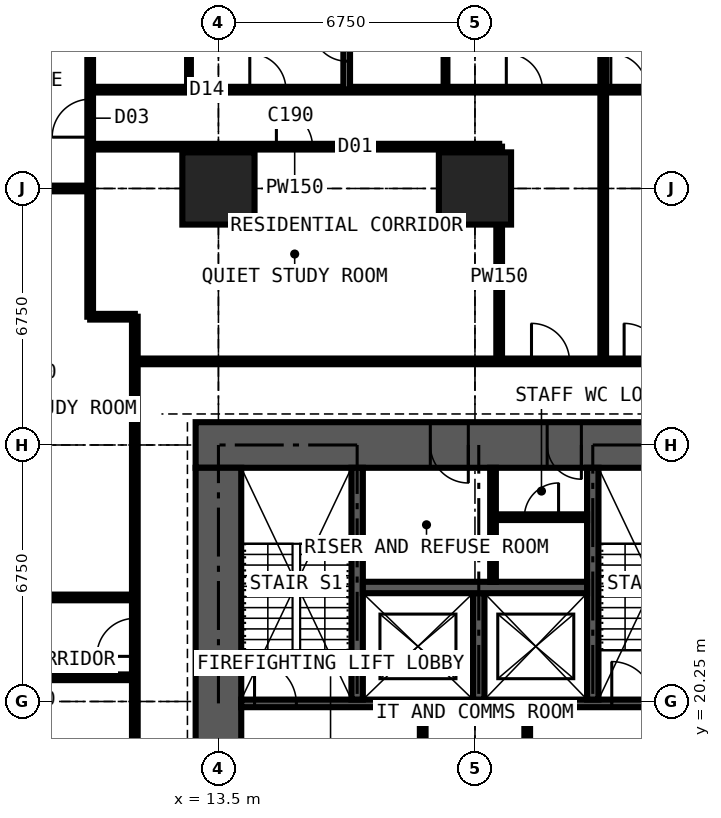
"""IFC4 building model, lengths in metres.
Left out: names, types, materials, properties, quantities, classifications, styles, units other than length and angle.
Written with IfcOpenShell. Run it as: python <this file> out.ifc"""

import sys

from ifc_helpers import new_model, si_unit, direction, frame, frame_2d, origin, origin_2d, place, context, subcontext, project, spatial, rectangle, extrude, element, fill, save


model = new_model("IFC4")
c1 = context("Model", 3, precision=1e-05, world=origin(), true_north=direction((0.0, 1.0)))
c2 = subcontext(c1, "Body", "Model", "MODEL_VIEW")
j1 = project(units=[si_unit("LENGTHUNIT", "METRE"), si_unit("PLANEANGLEUNIT", "RADIAN")], contexts=[c1])
p1 = place(None, origin())
s1 = spatial("IfcSite", under=j1, at=p1, CompositionType="ELEMENT")
p2 = place(p1, origin())
s2 = spatial("IfcBuilding", under=s1, at=p2, CompositionType="ELEMENT")
p3 = place(p2, frame((0.0, 0.0, 36.0)))
s3 = spatial("IfcBuildingStorey", under=s2, at=p3, CompositionType="ELEMENT", Elevation=36.0)
for number, where, z_axis, x_axis in (
    (1, (13.5, 33.75, 0.0), (0.0, 0.0, 1.0), (1.0, 0.0, 0.0)),
    (2, (20.25, 33.75, 0.0), (0.0, 0.0, 1.0), (1.0, 0.0, 0.0)),
):
    element("IfcColumn", number, at=place(p3, frame(where, z_axis=z_axis, x_axis=x_axis)), inside=s3, PredefinedType="COLUMN", context=c2, shape_type="SweptSolid", body=[
        extrude(rectangle(XDim=1.9, YDim=1.9, at=origin_2d()), origin(), (0.0, 0.0, 1.0), 3.6),
    ])
p4 = place(p3, frame((27.6, 27.0, 0.0), z_axis=(0.0, 0.0, 1.0), x_axis=(-1.0, 0.0, 0.0)))
e3 = element("IfcWall", 3, at=p4, inside=s3, PredefinedType="SHEAR", context=c2, shape_type="SweptSolid", body=[
    extrude(rectangle(XDim=14.7, YDim=1.2, at=frame_2d((7.35, 0.0))), origin(), (0.0, 0.0, 1.0), 3.6),
])
p5 = place(p4, frame((4.55, 0.0, 0.0)))
e4 = element("IfcOpeningElement", 4, at=p5, cuts=e3, PredefinedType="OPENING", context=c2, shape_type="SweptSolid", body=[
    extrude(rectangle(XDim=0.9, YDim=2.2, at=frame_2d((0.45, 1.1))), frame((0.0, 0.61, 0.0), z_axis=(0.0, -1.0, 0.0), x_axis=(1.0, 0.0, 0.0)), (0.0, 0.0, 1.0), 1.22),
])
p6 = place(p4, frame((7.525, 0.0, 0.0)))
e5 = element("IfcOpeningElement", 5, at=p6, cuts=e3, PredefinedType="OPENING", context=c2, shape_type="SweptSolid", body=[
    extrude(rectangle(XDim=1.0, YDim=2.2, at=frame_2d((0.5, 1.1))), frame((0.0, 0.61, 0.0), z_axis=(0.0, -1.0, 0.0), x_axis=(1.0, 0.0, 0.0)), (0.0, 0.0, 1.0), 1.22),
])
p7 = place(p3, frame((13.5, 26.4, 0.0), z_axis=(0.0, 0.0, 1.0), x_axis=(0.0, -1.0, 0.0)))
e6 = element("IfcWall", 6, at=p7, inside=s3, PredefinedType="SHEAR", context=c2, shape_type="SweptSolid", body=[
    extrude(rectangle(XDim=12.3, YDim=1.2, at=frame_2d((6.15, 0.0))), origin(), (0.0, 0.0, 1.0), 3.6),
])
p8 = place(p7, frame((7.45, 0.0, 0.0)))
e7 = element("IfcOpeningElement", 7, at=p8, cuts=e6, PredefinedType="OPENING", context=c2, shape_type="SweptSolid", body=[
    extrude(rectangle(XDim=1.2, YDim=2.2, at=frame_2d((0.6, 1.1))), frame((0.0, 0.61, 0.0), z_axis=(0.0, -1.0, 0.0), x_axis=(1.0, 0.0, 0.0)), (0.0, 0.0, 1.0), 1.22),
])
p9 = place(p3, frame((14.1, 20.2, 0.0), z_axis=(0.0, 0.0, 1.0), x_axis=(1.0, 0.0, 0.0)))
e8 = element("IfcWall", 8, at=p9, inside=s3, PredefinedType="SHEAR", context=c2, shape_type="SweptSolid", body=[
    extrude(rectangle(XDim=12.3, YDim=0.2, at=frame_2d((6.15, 0.0))), origin(), (0.0, 0.0, 1.0), 3.6),
])
p10 = place(p9, frame((0.35, 0.0, 0.0)))
e9 = element("IfcOpeningElement", 9, at=p10, cuts=e8, PredefinedType="OPENING", context=c2, shape_type="SweptSolid", body=[
    extrude(rectangle(XDim=1.1, YDim=2.2, at=frame_2d((0.55, 1.1))), frame((0.0, 0.11, 0.0), z_axis=(0.0, -1.0, 0.0), x_axis=(1.0, 0.0, 0.0)), (0.0, 0.0, 1.0), 0.22),
])
p11 = place(p9, frame((9.75, 0.0, 0.0)))
e10 = element("IfcOpeningElement", 10, at=p11, cuts=e8, PredefinedType="OPENING", context=c2, shape_type="SweptSolid", body=[
    extrude(rectangle(XDim=1.1, YDim=2.2, at=frame_2d((0.55, 1.1))), frame((0.0, 0.11, 0.0), z_axis=(0.0, -1.0, 0.0), x_axis=(1.0, 0.0, 0.0)), (0.0, 0.0, 1.0), 0.22),
])
for number, where, z_axis, x_axis in (
    (11, (17.15, 20.3, 0.0), (0.0, 0.0, 1.0), (0.0, 1.0, 0.0)),
    (12, (23.35, 20.3, 0.0), (0.0, 0.0, 1.0), (0.0, 1.0, 0.0)),
):
    element("IfcWall", number, at=place(p3, frame(where, z_axis=z_axis, x_axis=x_axis)), inside=s3, PredefinedType="SHEAR", context=c2, shape_type="SweptSolid", body=[
        extrude(rectangle(XDim=6.1, YDim=0.3, at=frame_2d((3.05, 0.0))), origin(), (0.0, 0.0, 1.0), 3.6),
    ])
p12 = place(p3, frame((20.35, 20.3, 0.0), z_axis=(0.0, 0.0, 1.0), x_axis=(0.0, 1.0, 0.0)))
e13 = element("IfcWall", 13, at=p12, inside=s3, PredefinedType="SHEAR", context=c2, shape_type="SweptSolid", body=[
    extrude(rectangle(XDim=2.8, YDim=0.3, at=frame_2d((1.4, 0.0))), origin(), (0.0, 0.0, 1.0), 3.6),
])
p13 = place(p3, frame((17.3, 23.25, 0.0), z_axis=(0.0, 0.0, 1.0), x_axis=(1.0, 0.0, 0.0)))
e14 = element("IfcWall", 14, at=p13, inside=s3, PredefinedType="SHEAR", context=c2, shape_type="SweptSolid", body=[
    extrude(rectangle(XDim=5.9, YDim=0.3, at=frame_2d((2.95, 0.0))), origin(), (0.0, 0.0, 1.0), 3.6),
])
p14 = place(p3, frame((18.875, 16.6, 0.0), z_axis=(0.0, 0.0, 1.0), x_axis=(0.0, 1.0, 0.0)))
e15 = element("IfcWall", 15, at=p14, inside=s3, PredefinedType="PARTITIONING", context=c2, shape_type="SweptSolid", body=[
    extrude(rectangle(XDim=3.5, YDim=0.15, at=frame_2d((1.75, 0.0))), origin(), (0.0, 0.0, 1.0), 3.375),
])
p15 = place(p14, frame((1.15, 0.0, 0.0)))
e16 = element("IfcOpeningElement", 16, at=p15, cuts=e15, PredefinedType="OPENING", context=c2, shape_type="SweptSolid", body=[
    extrude(rectangle(XDim=1.2, YDim=2.2, at=frame_2d((0.6, 1.1))), frame((0.0, 0.085, 0.0), z_axis=(0.0, -1.0, 0.0), x_axis=(1.0, 0.0, 0.0)), (0.0, 0.0, 1.0), 0.17),
])
p16 = place(p3, frame((21.625, 16.6, 0.0), z_axis=(0.0, 0.0, 1.0), x_axis=(0.0, 1.0, 0.0)))
e17 = element("IfcWall", 17, at=p16, inside=s3, PredefinedType="PARTITIONING", context=c2, shape_type="SweptSolid", body=[
    extrude(rectangle(XDim=3.5, YDim=0.15, at=frame_2d((1.75, 0.0))), origin(), (0.0, 0.0, 1.0), 3.375),
])
p17 = place(p16, frame((1.15, 0.0, 0.0)))
e18 = element("IfcOpeningElement", 18, at=p17, cuts=e17, PredefinedType="OPENING", context=c2, shape_type="SweptSolid", body=[
    extrude(rectangle(XDim=1.2, YDim=2.2, at=frame_2d((0.6, 1.1))), frame((0.0, 0.085, 0.0), z_axis=(0.0, -1.0, 0.0), x_axis=(1.0, 0.0, 0.0)), (0.0, 0.0, 1.0), 0.17),
])
p18 = place(p3, frame((20.725, 23.4, 0.0), z_axis=(0.0, 0.0, 1.0), x_axis=(0.0, 1.0, 0.0)))
e19 = element("IfcWall", 19, at=p18, inside=s3, PredefinedType="PARTITIONING", context=c2, shape_type="SweptSolid", body=[
    extrude(rectangle(XDim=3.0, YDim=0.15, at=frame_2d((1.5, 0.0))), origin(), (0.0, 0.0, 1.0), 3.375),
])
p19 = place(p3, frame((20.8, 25.1, 0.0), z_axis=(0.0, 0.0, 1.0), x_axis=(1.0, 0.0, 0.0)))
e20 = element("IfcWall", 20, at=p19, inside=s3, PredefinedType="PARTITIONING", context=c2, shape_type="SweptSolid", body=[
    extrude(rectangle(XDim=2.4, YDim=0.15, at=frame_2d((1.2, 0.0))), origin(), (0.0, 0.0, 1.0), 3.375),
])
p20 = place(p19, frame((0.75, 0.0, 0.0)))
e21 = element("IfcOpeningElement", 21, at=p20, cuts=e20, PredefinedType="OPENING", context=c2, shape_type="SweptSolid", body=[
    extrude(rectangle(XDim=0.9, YDim=2.2, at=frame_2d((0.45, 1.1))), frame((0.0, 0.085, 0.0), z_axis=(0.0, -1.0, 0.0), x_axis=(1.0, 0.0, 0.0)), (0.0, 0.0, 1.0), 0.17),
])
p21 = place(p3, frame((4.15, 33.75, 0.0), z_axis=(0.0, 0.0, 1.0), x_axis=(1.0, 0.0, 0.0)))
e22 = element("IfcWall", 22, at=p21, inside=s3, PredefinedType="PARTITIONING", context=c2, shape_type="SweptSolid", body=[
    extrude(rectangle(XDim=5.975, YDim=0.15, at=frame_2d((2.988, 0.0))), origin(), (0.0, 0.0, 1.0), 2.877),
])
for number, where, z_axis, x_axis in (
    (23, (5.65, 20.887, 0.0), (0.0, 0.0, 1.0), (1.0, 0.0, 0.0)),
    (24, (5.65, 22.988, 0.0), (0.0, 0.0, 1.0), (1.0, 0.0, 0.0)),
):
    element("IfcWall", number, at=place(p3, frame(where, z_axis=z_axis, x_axis=x_axis)), inside=s3, PredefinedType="PARTITIONING", context=c2, shape_type="SweptSolid", body=[
        extrude(rectangle(XDim=5.65, YDim=0.15, at=frame_2d((2.825, 0.0))), origin(), (0.0, 0.0, 1.0), 3.375),
    ])
p22 = place(p3, frame((10.125, 30.375, 0.0), z_axis=(0.0, 0.0, 1.0), x_axis=(0.0, 1.0, 0.0)))
e25 = element("IfcWall", 25, at=p22, inside=s3, PredefinedType="PARTITIONING", context=c2, shape_type="SweptSolid", body=[
    extrude(rectangle(XDim=10.859, YDim=0.15, at=frame_2d((5.429, 0.0))), origin(), (0.0, 0.0, 1.0), 3.375),
])
p23 = place(p22, frame((4.725, 0.0, 0.0)))
e26 = element("IfcOpeningElement", 26, at=p23, cuts=e25, PredefinedType="OPENING", context=c2, shape_type="SweptSolid", body=[
    extrude(rectangle(XDim=1.0, YDim=2.2, at=frame_2d((0.5, 1.1))), frame((0.0, 0.085, 0.0), z_axis=(0.0, -1.0, 0.0), x_axis=(1.0, 0.0, 0.0)), (0.0, 0.0, 1.0), 0.17),
])
p24 = place(p3, frame((10.125, 30.375, 0.0), z_axis=(0.0, 0.0, 1.0), x_axis=(1.0, 0.0, 0.0)))
e27 = element("IfcWall", 27, at=p24, inside=s3, PredefinedType="PARTITIONING", context=c2, shape_type="SweptSolid", body=[
    extrude(rectangle(XDim=1.175, YDim=0.15, at=frame_2d((0.587, 0.0))), origin(), (0.0, 0.0, 1.0), 3.375),
])
p25 = place(p3, frame((10.125, 34.85, 0.0), z_axis=(0.0, 0.0, 1.0), x_axis=(1.0, 0.0, 0.0)))
e28 = element("IfcWall", 28, at=p25, inside=s3, PredefinedType="PARTITIONING", context=c2, shape_type="SweptSolid", body=[
    extrude(rectangle(XDim=10.762, YDim=0.15, at=frame_2d((5.381, 0.0))), origin(), (0.0, 0.0, 1.0), 3.375),
])
p26 = place(p25, frame((4.9, 0.0, 0.0)))
e29 = element("IfcOpeningElement", 29, at=p26, cuts=e28, PredefinedType="OPENING", context=c2, shape_type="SweptSolid", body=[
    extrude(rectangle(XDim=0.95, YDim=2.2, at=frame_2d((0.475, 1.1))), frame((0.0, 0.085, 0.0), z_axis=(0.0, -1.0, 0.0), x_axis=(1.0, 0.0, 0.0)), (0.0, 0.0, 1.0), 0.17),
])
p27 = place(p3, frame((10.125, 36.35, 0.0), z_axis=(0.0, 0.0, 1.0), x_axis=(1.0, 0.0, 0.0)))
e30 = element("IfcWall", 30, at=p27, inside=s3, PredefinedType="PARTITIONING", context=c2, shape_type="SweptSolid", body=[
    extrude(rectangle(XDim=23.625, YDim=0.15, at=frame_2d((11.812, 0.0))), origin(), (0.0, 0.0, 1.0), 3.375),
])
p28 = place(p27, frame((20.5, 0.0, 0.0)))
e31 = element("IfcOpeningElement", 31, at=p28, cuts=e30, PredefinedType="OPENING", context=c2, shape_type="SweptSolid", body=[
    extrude(rectangle(XDim=0.95, YDim=2.2, at=frame_2d((0.475, 1.1))), frame((0.0, 0.085, 0.0), z_axis=(0.0, -1.0, 0.0), x_axis=(1.0, 0.0, 0.0)), (0.0, 0.0, 1.0), 0.17),
])
p29 = place(p27, frame((17.125, 0.0, 0.0)))
e32 = element("IfcOpeningElement", 32, at=p29, cuts=e30, PredefinedType="OPENING", context=c2, shape_type="SweptSolid", body=[
    extrude(rectangle(XDim=0.95, YDim=2.2, at=frame_2d((0.475, 1.1))), frame((0.0, 0.085, 0.0), z_axis=(0.0, -1.0, 0.0), x_axis=(1.0, 0.0, 0.0)), (0.0, 0.0, 1.0), 0.17),
])
p30 = place(p27, frame((13.7, 0.0, 0.0)))
e33 = element("IfcOpeningElement", 33, at=p30, cuts=e30, PredefinedType="OPENING", context=c2, shape_type="SweptSolid", body=[
    extrude(rectangle(XDim=0.95, YDim=2.2, at=frame_2d((0.475, 1.1))), frame((0.0, 0.085, 0.0), z_axis=(0.0, -1.0, 0.0), x_axis=(1.0, 0.0, 0.0)), (0.0, 0.0, 1.0), 0.17),
])
p31 = place(p27, frame((4.2, 0.0, 0.0)))
e34 = element("IfcOpeningElement", 34, at=p31, cuts=e30, PredefinedType="OPENING", context=c2, shape_type="SweptSolid", body=[
    extrude(rectangle(XDim=0.95, YDim=2.2, at=frame_2d((0.475, 1.1))), frame((0.0, 0.085, 0.0), z_axis=(0.0, -1.0, 0.0), x_axis=(1.0, 0.0, 0.0)), (0.0, 0.0, 1.0), 0.17),
])
p32 = place(p27, frame((10.95, 0.0, 0.0)))
e35 = element("IfcOpeningElement", 35, at=p32, cuts=e30, PredefinedType="OPENING", context=c2, shape_type="SweptSolid", body=[
    extrude(rectangle(XDim=0.95, YDim=2.2, at=frame_2d((0.475, 1.1))), frame((0.0, 0.085, 0.0), z_axis=(0.0, -1.0, 0.0), x_axis=(1.0, 0.0, 0.0)), (0.0, 0.0, 1.0), 0.17),
])
p33 = place(p3, frame((11.3, 11.3, 0.0), z_axis=(0.0, 0.0, 1.0), x_axis=(0.0, 1.0, 0.0)))
e36 = element("IfcWall", 36, at=p33, inside=s3, PredefinedType="PARTITIONING", context=c2, shape_type="SweptSolid", body=[
    extrude(rectangle(XDim=19.075, YDim=0.15, at=frame_2d((9.538, 0.0))), origin(), (0.0, 0.0, 1.0), 3.375),
])
p34 = place(p33, frame((10.137, 0.0, 0.0)))
e37 = element("IfcOpeningElement", 37, at=p34, cuts=e36, PredefinedType="OPENING", context=c2, shape_type="SweptSolid", body=[
    extrude(rectangle(XDim=1.0, YDim=2.2, at=frame_2d((0.5, 1.1))), frame((0.0, 0.085, 0.0), z_axis=(0.0, -1.0, 0.0), x_axis=(1.0, 0.0, 0.0)), (0.0, 0.0, 1.0), 0.17),
])
p35 = place(p3, frame((11.3, 29.2, 0.0), z_axis=(0.0, 0.0, 1.0), x_axis=(1.0, 0.0, 0.0)))
e38 = element("IfcWall", 38, at=p35, inside=s3, PredefinedType="PARTITIONING", context=c2, shape_type="SweptSolid", body=[
    extrude(rectangle(XDim=19.075, YDim=0.15, at=frame_2d((9.538, 0.0))), origin(), (0.0, 0.0, 1.0), 3.375),
])
p36 = place(p35, frame((12.875, 0.0, 0.0)))
e39 = element("IfcOpeningElement", 39, at=p36, cuts=e38, PredefinedType="OPENING", context=c2, shape_type="SweptSolid", body=[
    extrude(rectangle(XDim=1.0, YDim=2.2, at=frame_2d((0.5, 1.1))), frame((0.0, 0.085, 0.0), z_axis=(0.0, -1.0, 0.0), x_axis=(1.0, 0.0, 0.0)), (0.0, 0.0, 1.0), 0.17),
])
p37 = place(p35, frame((10.438, 0.0, 0.0)))
e40 = element("IfcOpeningElement", 40, at=p37, cuts=e38, PredefinedType="OPENING", context=c2, shape_type="SweptSolid", body=[
    extrude(rectangle(XDim=1.0, YDim=2.2, at=frame_2d((0.5, 1.1))), frame((0.0, 0.085, 0.0), z_axis=(0.0, -1.0, 0.0), x_axis=(1.0, 0.0, 0.0)), (0.0, 0.0, 1.0), 0.17),
])
p38 = place(p35, frame((14.875, 0.0, 0.0)))
e41 = element("IfcOpeningElement", 41, at=p38, cuts=e38, PredefinedType="OPENING", context=c2, shape_type="SweptSolid", body=[
    extrude(rectangle(XDim=0.95, YDim=2.2, at=frame_2d((0.475, 1.1))), frame((0.0, 0.085, 0.0), z_axis=(0.0, -1.0, 0.0), x_axis=(1.0, 0.0, 0.0)), (0.0, 0.0, 1.0), 0.17),
])
p39 = place(p3, frame((12.725, 36.35, 0.0), z_axis=(0.0, 0.0, 1.0), x_axis=(0.0, 1.0, 0.0)))
e42 = element("IfcWall", 42, at=p39, inside=s3, PredefinedType="PARTITIONING", context=c2, shape_type="SweptSolid", body=[
    extrude(rectangle(XDim=2.4, YDim=0.1, at=frame_2d((1.2, 0.0))), origin(), (0.0, 0.0, 1.0), 3.375),
])
p40 = place(p3, frame((16.875, 36.35, 0.0), z_axis=(0.0, 0.0, 1.0), x_axis=(0.0, 1.0, 0.0)))
e43 = element("IfcWall", 43, at=p40, inside=s3, PredefinedType="PARTITIONING", context=c2, shape_type="SweptSolid", body=[
    extrude(rectangle(XDim=4.884, YDim=0.175, at=frame_2d((2.442, 0.0))), origin(), (0.0, 0.0, 1.0), 3.375),
])
p41 = place(p40, frame((0.75, 0.0, 0.0)))
e44 = element("IfcOpeningElement", 44, at=p41, cuts=e43, PredefinedType="OPENING", context=c2, shape_type="SweptSolid", body=[
    extrude(rectangle(XDim=0.9, YDim=2.2, at=frame_2d((0.45, 1.1))), frame((0.0, 0.097, 0.0), z_axis=(0.0, -1.0, 0.0), x_axis=(1.0, 0.0, 0.0)), (0.0, 0.0, 1.0), 0.195),
])
p42 = place(p3, frame((19.475, 36.35, 0.0), z_axis=(0.0, 0.0, 1.0), x_axis=(0.0, 1.0, 0.0)))
e45 = element("IfcWall", 45, at=p42, inside=s3, PredefinedType="PARTITIONING", context=c2, shape_type="SweptSolid", body=[
    extrude(rectangle(XDim=2.4, YDim=0.1, at=frame_2d((1.2, 0.0))), origin(), (0.0, 0.0, 1.0), 3.375),
])
p43 = place(p3, frame((20.887, 29.2, 0.0), z_axis=(0.0, 0.0, 1.0), x_axis=(0.0, 1.0, 0.0)))
e46 = element("IfcWall", 46, at=p43, inside=s3, PredefinedType="PARTITIONING", context=c2, shape_type="SweptSolid", body=[
    extrude(rectangle(XDim=5.65, YDim=0.15, at=frame_2d((2.825, 0.0))), origin(), (0.0, 0.0, 1.0), 3.375),
])
p44 = place(p3, frame((23.625, 29.2, 0.0), z_axis=(0.0, 0.0, 1.0), x_axis=(0.0, 1.0, 0.0)))
e47 = element("IfcWall", 47, at=p44, inside=s3, PredefinedType="PARTITIONING", context=c2, shape_type="SweptSolid", body=[
    extrude(rectangle(XDim=12.034, YDim=0.15, at=frame_2d((6.017, 0.0))), origin(), (0.0, 0.0, 1.0), 3.375),
])
p45 = place(p20, origin())
e48 = element("IfcDoor", 48, at=p45, inside=s3, OperationType="SINGLE_SWING_RIGHT", PredefinedType="DOOR", context=c2, shape_type="SweptSolid", body=[
    extrude(rectangle(XDim=0.9, YDim=2.2, at=frame_2d((0.45, 1.1))), frame((0.0, 0.025, 0.0), z_axis=(0.0, -1.0, 0.0), x_axis=(1.0, 0.0, 0.0)), (0.0, 0.0, 1.0), 0.05),
])
fill(e21, e48)
p46 = place(p5, origin())
e49 = element("IfcDoor", 49, at=p46, inside=s3, OperationType="SINGLE_SWING_LEFT", PredefinedType="DOOR", context=c2, shape_type="SweptSolid", body=[
    extrude(rectangle(XDim=0.9, YDim=2.2, at=frame_2d((0.45, 1.1))), frame((0.0, 0.4, 0.0), z_axis=(0.0, -1.0, 0.0), x_axis=(1.0, 0.0, 0.0)), (0.0, 0.0, 1.0), 0.8),
])
fill(e4, e49)
p47 = place(p6, origin())
e50 = element("IfcDoor", 50, at=p47, inside=s3, OperationType="SINGLE_SWING_LEFT", PredefinedType="DOOR", context=c2, shape_type="SweptSolid", body=[
    extrude(rectangle(XDim=1.0, YDim=2.2, at=frame_2d((0.5, 1.1))), frame((0.0, 0.025, 0.0), z_axis=(0.0, -1.0, 0.0), x_axis=(1.0, 0.0, 0.0)), (0.0, 0.0, 1.0), 0.05),
])
fill(e5, e50)
p48 = place(p10, origin())
e51 = element("IfcDoor", 51, at=p48, inside=s3, OperationType="SINGLE_SWING_LEFT", PredefinedType="DOOR", context=c2, shape_type="SweptSolid", body=[
    extrude(rectangle(XDim=1.1, YDim=2.2, at=frame_2d((0.55, 1.1))), frame((0.0, 0.025, 0.0), z_axis=(0.0, -1.0, 0.0), x_axis=(1.0, 0.0, 0.0)), (0.0, 0.0, 1.0), 0.05),
])
fill(e9, e51)
p49 = place(p11, origin())
e52 = element("IfcDoor", 52, at=p49, inside=s3, OperationType="SINGLE_SWING_LEFT", PredefinedType="DOOR", context=c2, shape_type="SweptSolid", body=[
    extrude(rectangle(XDim=1.1, YDim=2.2, at=frame_2d((0.55, 1.1))), frame((0.0, 0.025, 0.0), z_axis=(0.0, -1.0, 0.0), x_axis=(1.0, 0.0, 0.0)), (0.0, 0.0, 1.0), 0.05),
])
fill(e10, e52)
p50 = place(p30, origin())
e53 = element("IfcDoor", 53, at=p50, inside=s3, OperationType="SINGLE_SWING_LEFT", PredefinedType="DOOR", context=c2, shape_type="SweptSolid", body=[
    extrude(rectangle(XDim=0.95, YDim=2.2, at=frame_2d((0.475, 1.1))), frame((0.0, 0.025, 0.0), z_axis=(0.0, -1.0, 0.0), x_axis=(1.0, 0.0, 0.0)), (0.0, 0.0, 1.0), 0.05),
])
fill(e33, e53)
p51 = place(p36, origin())
e54 = element("IfcDoor", 54, at=p51, inside=s3, OperationType="SINGLE_SWING_LEFT", PredefinedType="DOOR", context=c2, shape_type="SweptSolid", body=[
    extrude(rectangle(XDim=1.0, YDim=2.2, at=frame_2d((0.5, 1.1))), frame((0.0, 0.025, 0.0), z_axis=(0.0, -1.0, 0.0), x_axis=(1.0, 0.0, 0.0)), (0.0, 0.0, 1.0), 0.05),
])
fill(e39, e54)
p52 = place(p31, origin())
e55 = element("IfcDoor", 55, at=p52, inside=s3, OperationType="SINGLE_SWING_LEFT", PredefinedType="DOOR", context=c2, shape_type="SweptSolid", body=[
    extrude(rectangle(XDim=0.95, YDim=2.2, at=frame_2d((0.475, 1.1))), frame((0.0, 0.025, 0.0), z_axis=(0.0, -1.0, 0.0), x_axis=(1.0, 0.0, 0.0)), (0.0, 0.0, 1.0), 0.05),
])
fill(e34, e55)
p53 = place(p32, origin())
e56 = element("IfcDoor", 56, at=p53, inside=s3, OperationType="SINGLE_SWING_LEFT", PredefinedType="DOOR", context=c2, shape_type="SweptSolid", body=[
    extrude(rectangle(XDim=0.95, YDim=2.2, at=frame_2d((0.475, 1.1))), frame((0.0, 0.025, 0.0), z_axis=(0.0, -1.0, 0.0), x_axis=(1.0, 0.0, 0.0)), (0.0, 0.0, 1.0), 0.05),
])
fill(e35, e56)
p54 = place(p41, origin())
e57 = element("IfcDoor", 57, at=p54, inside=s3, OperationType="SINGLE_SWING_RIGHT", PredefinedType="DOOR", context=c2, shape_type="SweptSolid", body=[
    extrude(rectangle(XDim=0.9, YDim=2.2, at=frame_2d((0.45, 1.1))), frame((0.0, 0.025, 0.0), z_axis=(0.0, -1.0, 0.0), x_axis=(1.0, 0.0, 0.0)), (0.0, 0.0, 1.0), 0.05),
])
fill(e44, e57)
p55 = place(p37, origin())
e58 = element("IfcDoor", 58, at=p55, inside=s3, OperationType="SINGLE_SWING_LEFT", PredefinedType="DOOR", context=c2, shape_type="SweptSolid", body=[
    extrude(rectangle(XDim=1.0, YDim=2.2, at=frame_2d((0.5, 1.1))), frame((0.0, 0.025, 0.0), z_axis=(0.0, -1.0, 0.0), x_axis=(1.0, 0.0, 0.0)), (0.0, 0.0, 1.0), 0.05),
])
fill(e40, e58)
p56 = place(p26, origin())
e59 = element("IfcDoor", 59, at=p56, inside=s3, OperationType="SINGLE_SWING_LEFT", PredefinedType="DOOR", context=c2, shape_type="SweptSolid", body=[
    extrude(rectangle(XDim=0.95, YDim=2.2, at=frame_2d((0.475, 1.1))), frame((0.0, 0.025, 0.0), z_axis=(0.0, -1.0, 0.0), x_axis=(1.0, 0.0, 0.0)), (0.0, 0.0, 1.0), 0.05),
])
fill(e29, e59)
p57 = place(p23, origin())
e60 = element("IfcDoor", 60, at=p57, inside=s3, OperationType="SINGLE_SWING_LEFT", PredefinedType="DOOR", context=c2, shape_type="SweptSolid", body=[
    extrude(rectangle(XDim=1.0, YDim=2.2, at=frame_2d((0.5, 1.1))), frame((0.0, 0.025, 0.0), z_axis=(0.0, -1.0, 0.0), x_axis=(1.0, 0.0, 0.0)), (0.0, 0.0, 1.0), 0.05),
])
fill(e26, e60)
p58 = place(p34, origin())
e61 = element("IfcDoor", 61, at=p58, inside=s3, OperationType="SINGLE_SWING_LEFT", PredefinedType="DOOR", context=c2, shape_type="SweptSolid", body=[
    extrude(rectangle(XDim=1.0, YDim=2.2, at=frame_2d((0.5, 1.1))), frame((0.0, 0.025, 0.0), z_axis=(0.0, -1.0, 0.0), x_axis=(1.0, 0.0, 0.0)), (0.0, 0.0, 1.0), 0.05),
])
fill(e37, e61)
save(model, sys.argv[1])
